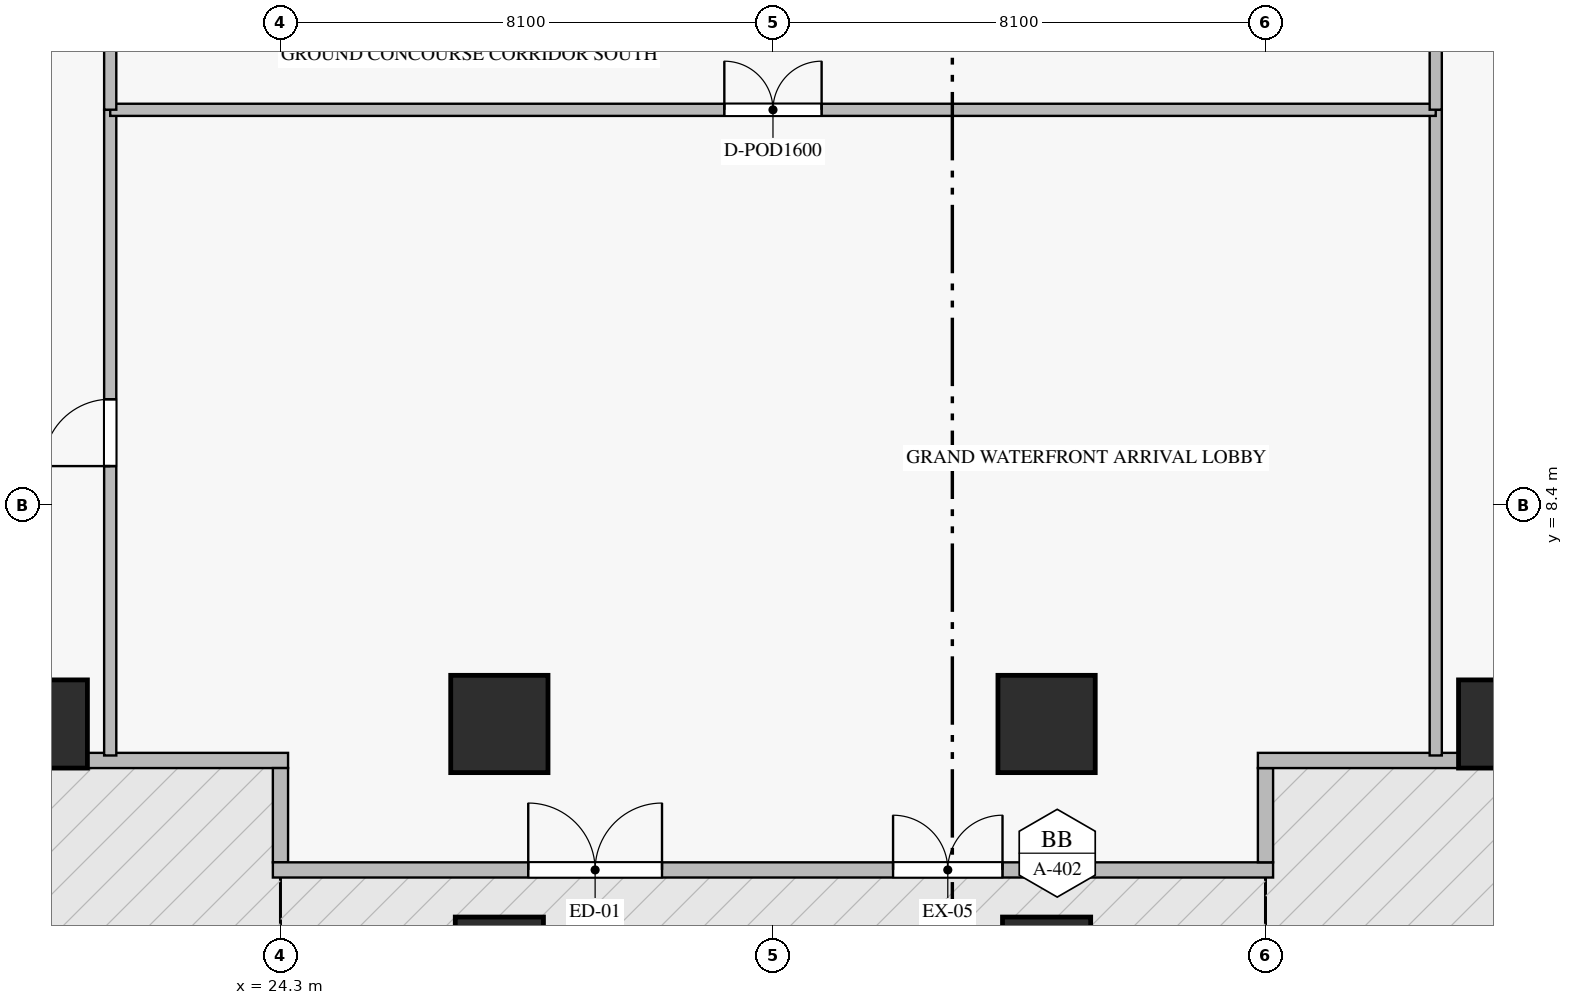
"""IFC4 building model, lengths in metres.
Left out: names, types, materials, properties, quantities, classifications, styles, units other than length and angle.
Written with IfcOpenShell. Run it as: python <this file> out.ifc"""

import sys

from ifc_helpers import new_model, si_unit, direction, frame, frame_2d, origin, origin_2d, place, context, subcontext, project, spatial, rectangle, extrude, source, transform, mapped, element, fill, save


model = new_model("IFC4")
c1 = context("Model", 3, precision=1e-05, world=origin(), true_north=direction((0.0, 1.0)))
c2 = subcontext(c1, "Body", "Model", "MODEL_VIEW")
j1 = project(units=[si_unit("LENGTHUNIT", "METRE"), si_unit("PLANEANGLEUNIT", "RADIAN")], contexts=[c1])
p1 = place(None, origin())
s1 = spatial("IfcSite", under=j1, at=p1, CompositionType="ELEMENT")
p2 = place(p1, origin())
s2 = spatial("IfcBuilding", under=s1, at=p2, CompositionType="ELEMENT")
p3 = place(p2, origin())
s3 = spatial("IfcBuildingStorey", under=s2, at=p3, CompositionType="ELEMENT", Elevation=0.0)
m1 = source(origin(), c2, "Body", "SweptSolid", [
    extrude(rectangle(XDim=1.45, YDim=1.45, at=origin_2d()), origin(), (0.0, 0.0, 1.0), 5.5),
])
p4 = place(p3, frame((20.4, 4.8, -0.38), z_axis=(0.0, 0.0, 1.0), x_axis=(1.0, 0.0, 0.0)))
e1 = element("IfcColumn", 1, at=p4, inside=s3, PredefinedType="COLUMN", context=c2, shape_type="MappedRepresentation", body=[
    mapped(m1, transform((0.0, 0.0, 0.0), scale=1.0)),
])
m2 = source(origin(), c2, "Body", "SweptSolid", [
    extrude(rectangle(XDim=1.6, YDim=1.6, at=origin_2d()), origin(), (0.0, 0.0, 1.0), 5.5),
])
for number, where, z_axis, x_axis in (
    (2, (27.9, 4.8, -0.38), (0.0, 0.0, 1.0), (1.0, 0.0, 0.0)),
    (3, (36.9, 4.8, -0.38), (0.0, 0.0, 1.0), (1.0, 0.0, 0.0)),
):
    element("IfcColumn", number, at=place(p3, frame(where, z_axis=z_axis, x_axis=x_axis)), inside=s3, PredefinedType="COLUMN", context=c2, shape_type="MappedRepresentation", body=[
        mapped(m2, transform((0.0, 0.0, 0.0), scale=1.0)),
    ])
for number, where, z_axis, x_axis in (
    (4, (44.4, 4.8, -0.38), (0.0, 0.0, 1.0), (1.0, 0.0, 0.0)),
    (5, (27.9, 0.9, -0.38), (0.0, 0.0, 1.0), (1.0, 0.0, 0.0)),
    (6, (36.9, 0.9, -0.38), (0.0, 0.0, 1.0), (1.0, 0.0, 0.0)),
):
    element("IfcColumn", number, at=place(p3, frame(where, z_axis=z_axis, x_axis=x_axis)), inside=s3, PredefinedType="COLUMN", context=c2, shape_type="MappedRepresentation", body=[
        mapped(m1, transform((0.0, 0.0, 0.0), scale=1.0)),
    ])
p5 = place(p3, frame((-0.125, 4.2, 0.0), z_axis=(0.0, 0.0, 1.0), x_axis=(1.0, 0.0, 0.0)))
e7 = element("IfcWall", 7, at=p5, inside=s3, PredefinedType="ELEMENTEDWALL", context=c2, shape_type="SweptSolid", body=[
    extrude(rectangle(XDim=24.55, YDim=0.25, at=frame_2d((12.275, 0.0))), origin(), (0.0, 0.0, 1.0), 5.105),
])
p6 = place(p5, frame((7.4, 0.0, 0.0)))
e8 = element("IfcOpeningElement", 8, at=p6, cuts=e7, PredefinedType="OPENING", context=c2, shape_type="SweptSolid", body=[
    extrude(rectangle(XDim=1.6, YDim=2.4, at=frame_2d((0.8, 1.2))), frame((0.0, 0.135, 0.0), z_axis=(0.0, -1.0, 0.0), x_axis=(1.0, 0.0, 0.0)), (0.0, 0.0, 1.0), 0.27),
])
p7 = place(p5, frame((15.4, 0.0, 0.4)))
e9 = element("IfcOpeningElement", 9, at=p7, cuts=e7, PredefinedType="OPENING", context=c2, shape_type="SweptSolid", body=[
    extrude(rectangle(XDim=2.8, YDim=3.0, at=frame_2d((1.4, 1.5))), frame((0.0, 0.135, 0.0), z_axis=(0.0, -1.0, 0.0), x_axis=(1.0, 0.0, 0.0)), (0.0, 0.0, 1.0), 0.27),
])
p8 = place(p3, frame((24.3, 4.075, 0.0), z_axis=(0.0, 0.0, 1.0), x_axis=(0.0, -1.0, 0.0)))
e10 = element("IfcWall", 10, at=p8, inside=s3, PredefinedType="ELEMENTEDWALL", context=c2, shape_type="SweptSolid", body=[
    extrude(rectangle(XDim=1.55, YDim=0.25, at=frame_2d((0.775, 0.0))), origin(), (0.0, 0.0, 1.0), 5.105),
])
p9 = place(p3, frame((24.175, 2.4, 0.0), z_axis=(0.0, 0.0, 1.0), x_axis=(1.0, 0.0, 0.0)))
e11 = element("IfcWall", 11, at=p9, inside=s3, PredefinedType="ELEMENTEDWALL", context=c2, shape_type="SweptSolid", body=[
    extrude(rectangle(XDim=16.45, YDim=0.25, at=frame_2d((8.225, 0.0))), origin(), (0.0, 0.0, 1.0), 5.105),
])
p10 = place(p9, frame((4.2, 0.0, 0.0)))
e12 = element("IfcOpeningElement", 12, at=p10, cuts=e11, PredefinedType="OPENING", context=c2, shape_type="SweptSolid", body=[
    extrude(rectangle(XDim=2.2, YDim=2.6, at=frame_2d((1.1, 1.3))), frame((0.0, 0.135, 0.0), z_axis=(0.0, -1.0, 0.0), x_axis=(1.0, 0.0, 0.0)), (0.0, 0.0, 1.0), 0.27),
])
p11 = place(p9, frame((10.2, 0.0, 0.0)))
e13 = element("IfcOpeningElement", 13, at=p11, cuts=e11, PredefinedType="OPENING", context=c2, shape_type="SweptSolid", body=[
    extrude(rectangle(XDim=1.8, YDim=2.3, at=frame_2d((0.9, 1.15))), frame((0.0, 0.135, 0.0), z_axis=(0.0, -1.0, 0.0), x_axis=(1.0, 0.0, 0.0)), (0.0, 0.0, 1.0), 0.27),
])
p12 = place(p3, frame((40.5, 2.525, 0.0), z_axis=(0.0, 0.0, 1.0), x_axis=(0.0, 1.0, 0.0)))
e14 = element("IfcWall", 14, at=p12, inside=s3, PredefinedType="ELEMENTEDWALL", context=c2, shape_type="SweptSolid", body=[
    extrude(rectangle(XDim=1.55, YDim=0.25, at=frame_2d((0.775, 0.0))), origin(), (0.0, 0.0, 1.0), 5.105),
])
p13 = place(p3, frame((40.375, 4.2, 0.0), z_axis=(0.0, 0.0, 1.0), x_axis=(1.0, 0.0, 0.0)))
e15 = element("IfcWall", 15, at=p13, inside=s3, PredefinedType="ELEMENTEDWALL", context=c2, shape_type="SweptSolid", body=[
    extrude(rectangle(XDim=24.55, YDim=0.25, at=frame_2d((12.275, 0.0))), origin(), (0.0, 0.0, 1.0), 5.105),
])
p14 = place(p13, frame((7.4, 0.0, 0.0)))
e16 = element("IfcOpeningElement", 16, at=p14, cuts=e15, PredefinedType="OPENING", context=c2, shape_type="SweptSolid", body=[
    extrude(rectangle(XDim=1.6, YDim=2.4, at=frame_2d((0.8, 1.2))), frame((0.0, 0.135, 0.0), z_axis=(0.0, -1.0, 0.0), x_axis=(1.0, 0.0, 0.0)), (0.0, 0.0, 1.0), 0.27),
])
p15 = place(p3, frame((21.5, 4.282, 0.0), z_axis=(0.0, 0.0, 1.0), x_axis=(0.0, 1.0, 0.0)))
e17 = element("IfcWall", 17, at=p15, inside=s3, PredefinedType="STANDARD", context=c2, shape_type="SweptSolid", body=[
    extrude(rectangle(XDim=10.618, YDim=0.2, at=frame_2d((5.309, 0.0))), origin(), (0.0, 0.0, 1.0), 5.12),
])
p16 = place(p15, frame((4.759, 0.0, 0.0)))
e18 = element("IfcOpeningElement", 18, at=p16, cuts=e17, PredefinedType="OPENING", context=c2, shape_type="SweptSolid", body=[
    extrude(rectangle(XDim=1.1, YDim=2.15, at=frame_2d((0.55, 1.075))), frame((0.0, 0.11, 0.0), z_axis=(0.0, -1.0, 0.0), x_axis=(1.0, 0.0, 0.0)), (0.0, 0.0, 1.0), 0.22),
])
p17 = place(p3, frame((43.3, 4.282, 0.0), z_axis=(0.0, 0.0, 1.0), x_axis=(0.0, 1.0, 0.0)))
e19 = element("IfcWall", 19, at=p17, inside=s3, PredefinedType="STANDARD", context=c2, shape_type="SweptSolid", body=[
    extrude(rectangle(XDim=10.618, YDim=0.2, at=frame_2d((5.309, 0.0))), origin(), (0.0, 0.0, 1.0), 5.12),
])
p18 = place(p3, frame((21.5, 14.9, 0.0), z_axis=(0.0, 0.0, 1.0), x_axis=(1.0, 0.0, 0.0)))
e20 = element("IfcWall", 20, at=p18, inside=s3, PredefinedType="STANDARD", context=c2, shape_type="SweptSolid", body=[
    extrude(rectangle(XDim=21.8, YDim=0.2, at=frame_2d((10.9, 0.0))), origin(), (0.0, 0.0, 1.0), 5.12),
])
p19 = place(p18, frame((10.1, 0.0, 0.0)))
e21 = element("IfcOpeningElement", 21, at=p19, cuts=e20, PredefinedType="OPENING", context=c2, shape_type="SweptSolid", body=[
    extrude(rectangle(XDim=1.6, YDim=2.3, at=frame_2d((0.8, 1.15))), frame((0.0, 0.11, 0.0), z_axis=(0.0, -1.0, 0.0), x_axis=(1.0, 0.0, 0.0)), (0.0, 0.0, 1.0), 0.22),
])
p20 = place(p3, frame((21.5, 14.902, 0.0), z_axis=(0.0, 0.0, 1.0), x_axis=(0.0, 1.0, 0.0)))
e22 = element("IfcWall", 22, at=p20, inside=s3, PredefinedType="STANDARD", context=c2, shape_type="SweptSolid", body=[
    extrude(rectangle(XDim=4.698, YDim=0.2, at=frame_2d((2.349, 0.0))), origin(), (0.0, 0.0, 1.0), 5.12),
])
p21 = place(p20, frame((1.599, 0.0, 0.0)))
e23 = element("IfcOpeningElement", 23, at=p21, cuts=e22, PredefinedType="OPENING", context=c2, shape_type="SweptSolid", body=[
    extrude(rectangle(XDim=1.5, YDim=2.25, at=frame_2d((0.75, 1.125))), frame((0.0, 0.11, 0.0), z_axis=(0.0, -1.0, 0.0), x_axis=(1.0, 0.0, 0.0)), (0.0, 0.0, 1.0), 0.22),
])
p22 = place(p3, frame((43.3, 14.902, 0.0), z_axis=(0.0, 0.0, 1.0), x_axis=(0.0, 1.0, 0.0)))
e24 = element("IfcWall", 24, at=p22, inside=s3, PredefinedType="STANDARD", context=c2, shape_type="SweptSolid", body=[
    extrude(rectangle(XDim=4.698, YDim=0.2, at=frame_2d((2.349, 0.0))), origin(), (0.0, 0.0, 1.0), 5.12),
])
p23 = place(p22, frame((1.599, 0.0, 0.0)))
e25 = element("IfcOpeningElement", 25, at=p23, cuts=e24, PredefinedType="OPENING", context=c2, shape_type="SweptSolid", body=[
    extrude(rectangle(XDim=1.5, YDim=2.25, at=frame_2d((0.75, 1.125))), frame((0.0, 0.11, 0.0), z_axis=(0.0, -1.0, 0.0), x_axis=(1.0, 0.0, 0.0)), (0.0, 0.0, 1.0), 0.22),
])
m3 = source(origin(), c2, "Body", "SweptSolid", [
    extrude(rectangle(XDim=2.2, YDim=2.6, at=frame_2d((1.1, 1.3))), frame((0.0, 0.025, 0.0), z_axis=(0.0, -1.0, 0.0), x_axis=(1.0, 0.0, 0.0)), (0.0, 0.0, 1.0), 0.05),
])
p24 = place(p10, origin())
e26 = element("IfcDoor", 26, at=p24, inside=s3, OperationType="DOUBLE_DOOR_SINGLE_SWING", PredefinedType="DOOR", context=c2, shape_type="MappedRepresentation", body=[
    mapped(m3, transform((0.0, 0.0, 0.0), scale=1.0)),
])
fill(e12, e26)
m4 = source(origin(), c2, "Body", "SweptSolid", [
    extrude(rectangle(XDim=1.8, YDim=2.3, at=frame_2d((0.9, 1.15))), frame((0.0, 0.025, 0.0), z_axis=(0.0, -1.0, 0.0), x_axis=(1.0, 0.0, 0.0)), (0.0, 0.0, 1.0), 0.05),
])
p25 = place(p11, frame((1.8, 0.0, 0.0), z_axis=(0.0, 0.0, 1.0), x_axis=(-1.0, 0.0, 0.0)))
e27 = element("IfcDoor", 27, at=p25, inside=s3, OperationType="DOUBLE_DOOR_SINGLE_SWING", PredefinedType="DOOR", context=c2, shape_type="MappedRepresentation", body=[
    mapped(m4, transform((0.0, 0.0, 0.0), scale=1.0)),
])
fill(e13, e27)
m5 = source(origin(), c2, "Body", "SweptSolid", [
    extrude(rectangle(XDim=1.1, YDim=2.15, at=frame_2d((0.55, 1.075))), frame((0.0, 0.025, 0.0), z_axis=(0.0, -1.0, 0.0), x_axis=(1.0, 0.0, 0.0)), (0.0, 0.0, 1.0), 0.05),
])
p26 = place(p16, origin())
e28 = element("IfcDoor", 28, at=p26, inside=s3, OperationType="SINGLE_SWING_LEFT", PredefinedType="DOOR", context=c2, shape_type="MappedRepresentation", body=[
    mapped(m5, transform((0.0, 0.0, 0.0), scale=1.0)),
])
fill(e18, e28)
m6 = source(origin(), c2, "Body", "SweptSolid", [
    extrude(rectangle(XDim=1.6, YDim=2.3, at=frame_2d((0.8, 1.15))), frame((0.0, 0.025, 0.0), z_axis=(0.0, -1.0, 0.0), x_axis=(1.0, 0.0, 0.0)), (0.0, 0.0, 1.0), 0.05),
])
p27 = place(p19, origin())
e29 = element("IfcDoor", 29, at=p27, inside=s3, OperationType="DOUBLE_DOOR_SINGLE_SWING", PredefinedType="DOOR", context=c2, shape_type="MappedRepresentation", body=[
    mapped(m6, transform((0.0, 0.0, 0.0), scale=1.0)),
])
fill(e21, e29)
save(model, sys.argv[1])
